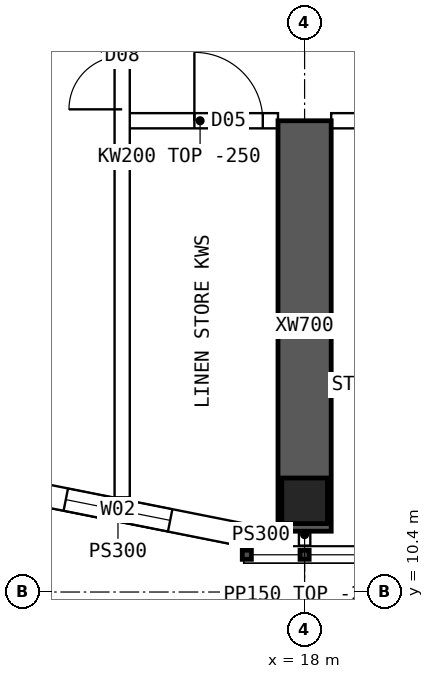
"""IFC4 building model, lengths in metres.
Left out: names, types, materials, properties, quantities, classifications, styles, units other than length and angle.
Written with IfcOpenShell. Run it as: python <this file> out.ifc"""

import sys

from ifc_helpers import new_model, si_unit, direction, frame, frame_2d, origin, origin_2d, place, context, subcontext, project, spatial, polyline, rectangle, hollow_rectangle, outline, extrude, element, fill, save


model = new_model("IFC4")
c1 = context("Model", 3, precision=1e-05, world=origin(), true_north=direction((0.0, 1.0)))
c2 = subcontext(c1, "Body", "Model", "MODEL_VIEW")
j1 = project(units=[si_unit("LENGTHUNIT", "METRE"), si_unit("PLANEANGLEUNIT", "RADIAN")], contexts=[c1])
p1 = place(None, origin())
s1 = spatial("IfcSite", under=j1, at=p1, CompositionType="ELEMENT")
p2 = place(p1, origin())
s2 = spatial("IfcBuilding", under=s1, at=p2, CompositionType="ELEMENT")
p3 = place(p2, frame((0.0, 0.0, 224.05)))
s3 = spatial("IfcBuildingStorey", under=s2, at=p3, CompositionType="ELEMENT", Elevation=224.05)
p4 = place(p3, frame((18.0, 11.6, 0.0), z_axis=(0.0, 0.0, 1.0), x_axis=(1.0, 0.0, 0.0)))
e1 = element("IfcColumn", 1, at=p4, inside=s3, PredefinedType="COLUMN", context=c2, shape_type="SweptSolid", body=[
    extrude(hollow_rectangle(XDim=0.6, YDim=0.6, WallThickness=0.06, at=origin_2d()), origin(), (0.0, 0.0, 1.0), 3.75),
])
p5 = place(p3, frame((18.0, 11.2, 0.0), z_axis=(0.0, 0.0, 1.0), x_axis=(0.0, 1.0, 0.0)))
e2 = element("IfcWall", 2, at=p5, inside=s3, PredefinedType="SHEAR", context=c2, shape_type="SweptSolid", body=[
    extrude(rectangle(XDim=5.4, YDim=0.7, at=frame_2d((2.7, 0.0))), origin(), (0.0, 0.0, 1.0), 3.75),
])
p6 = place(p3, frame((13.89, 11.808, 0.0), z_axis=(0.0, 0.0, 1.0), x_axis=(0.98078325777, -0.195100490205, 0.0)))
e3 = element("IfcWall", 3, at=p6, inside=s3, PredefinedType="SOLIDWALL", context=c2, shape_type="SweptSolid", body=[
    extrude(outline(polyline([(-0.03, -0.15), (3.405, -0.15), (3.345, 0.15), (0.03, 0.15), (-0.03, -0.15)])), origin(), (0.0, 0.0, 1.0), 3.5),
])
p7 = place(p6, frame((0.988, 0.0, 0.9)))
e4 = element("IfcOpeningElement", 4, at=p7, cuts=e3, PredefinedType="OPENING", context=c2, shape_type="SweptSolid", body=[
    extrude(rectangle(XDim=1.4, YDim=1.8, at=frame_2d((0.7, 0.9))), frame((0.0, 0.16, 0.0), z_axis=(0.0, -1.0, 0.0), x_axis=(1.0, 0.0, 0.0)), (0.0, 0.0, 1.0), 0.32),
])
p8 = place(p3, frame((17.2, 11.15, 0.0), z_axis=(0.0, 0.0, 1.0), x_axis=(1.0, 0.0, 0.0)))
e5 = element("IfcWall", 5, at=p8, inside=s3, PredefinedType="SOLIDWALL", context=c2, shape_type="SweptSolid", body=[
    extrude(rectangle(XDim=0.45, YDim=0.3, at=frame_2d((0.225, 0.0))), origin(), (0.0, 0.0, 1.0), 3.5),
])
p9 = place(p3, frame((15.6, 16.6, 0.0), z_axis=(0.0, 0.0, 1.0), x_axis=(1.0, 0.0, 0.0)))
e6 = element("IfcWall", 6, at=p9, inside=s3, PredefinedType="SOLIDWALL", context=c2, shape_type="SweptSolid", body=[
    extrude(rectangle(XDim=2.05, YDim=0.2, at=frame_2d((1.025, 0.0))), origin(), (0.0, 0.0, 1.0), 3.5),
])
p10 = place(p9, frame((0.95, 0.0, 0.0)))
e7 = element("IfcOpeningElement", 7, at=p10, cuts=e6, PredefinedType="OPENING", context=c2, shape_type="SweptSolid", body=[
    extrude(rectangle(XDim=0.9, YDim=2.1, at=frame_2d((0.45, 1.05))), frame((0.0, 0.11, 0.0), z_axis=(0.0, -1.0, 0.0), x_axis=(1.0, 0.0, 0.0)), (0.0, 0.0, 1.0), 0.22),
])
p11 = place(p3, frame((18.35, 16.6, 0.0), z_axis=(0.0, 0.0, 1.0), x_axis=(1.0, 0.0, 0.0)))
e8 = element("IfcWall", 8, at=p11, inside=s3, PredefinedType="SOLIDWALL", context=c2, shape_type="SweptSolid", body=[
    extrude(outline(polyline([(0.0, 0.0), (5.3, 0.0), (5.3, 3.1), (0.0, 3.1), (0.0, 0.0)])), frame((0.0, 0.1, 0.0), z_axis=(0.0, -1.0, 0.0), x_axis=(1.0, 0.0, 0.0)), (0.0, 0.0, 1.0), 0.2),
])
p12 = place(p11, frame((2.3, 0.0, 0.0)))
e9 = element("IfcOpeningElement", 9, at=p12, cuts=e8, PredefinedType="OPENING", context=c2, shape_type="SweptSolid", body=[
    extrude(rectangle(XDim=0.9, YDim=2.1, at=frame_2d((0.45, 1.05))), frame((0.0, 0.11, 0.0), z_axis=(0.0, -1.0, 0.0), x_axis=(1.0, 0.0, 0.0)), (0.0, 0.0, 1.0), 0.22),
])
p13 = place(p3, frame((15.6, 11.646, 0.0), z_axis=(0.0, 0.0, 1.0), x_axis=(0.0, 1.0, 0.0)))
e10 = element("IfcWall", 10, at=p13, inside=s3, PredefinedType="SOLIDWALL", context=c2, shape_type="SweptSolid", body=[
    extrude(rectangle(XDim=40.708, YDim=0.2, at=frame_2d((20.354, 0.0))), origin(), (0.0, 0.0, 1.0), 3.5),
])
p14 = place(p13, frame((13.434, 0.0, 0.0)))
e11 = element("IfcOpeningElement", 11, at=p14, cuts=e10, PredefinedType="OPENING", context=c2, shape_type="SweptSolid", body=[
    extrude(rectangle(XDim=1.2, YDim=2.1, at=frame_2d((0.6, 1.05))), frame((0.0, 0.11, 0.0), z_axis=(0.0, -1.0, 0.0), x_axis=(1.0, 0.0, 0.0)), (0.0, 0.0, 1.0), 0.22),
])
p15 = place(p13, frame((26.074, 0.0, 0.0)))
e12 = element("IfcOpeningElement", 12, at=p15, cuts=e10, PredefinedType="OPENING", context=c2, shape_type="SweptSolid", body=[
    extrude(rectangle(XDim=1.2, YDim=2.1, at=frame_2d((0.6, 1.05))), frame((0.0, 0.11, 0.0), z_axis=(0.0, -1.0, 0.0), x_axis=(1.0, 0.0, 0.0)), (0.0, 0.0, 1.0), 0.22),
])
p16 = place(p13, frame((5.104, 0.0, 0.0)))
e13 = element("IfcOpeningElement", 13, at=p16, cuts=e10, PredefinedType="OPENING", context=c2, shape_type="SweptSolid", body=[
    extrude(rectangle(XDim=1.4, YDim=2.1, at=frame_2d((0.7, 1.05))), frame((0.0, 0.11, 0.0), z_axis=(0.0, -1.0, 0.0), x_axis=(1.0, 0.0, 0.0)), (0.0, 0.0, 1.0), 0.22),
])
p17 = place(p13, frame((34.104, 0.0, 0.0)))
e14 = element("IfcOpeningElement", 14, at=p17, cuts=e10, PredefinedType="OPENING", context=c2, shape_type="SweptSolid", body=[
    extrude(rectangle(XDim=1.4, YDim=2.1, at=frame_2d((0.7, 1.05))), frame((0.0, 0.11, 0.0), z_axis=(0.0, -1.0, 0.0), x_axis=(1.0, 0.0, 0.0)), (0.0, 0.0, 1.0), 0.22),
])
p18 = place(p3, frame((18.0, 11.3, 0.0), z_axis=(0.0, 0.0, 1.0), x_axis=(0.0, -1.0, 0.0)))
e15 = element("IfcWall", 15, at=p18, inside=s3, PredefinedType="PARTITIONING", context=c2, shape_type="SweptSolid", body=[
    extrude(rectangle(XDim=0.29, YDim=0.15, at=frame_2d((0.145, 0.0))), origin(), (0.0, 0.0, 1.0), 3.5),
])
p19 = place(p7, origin())
e16 = element("IfcWindow", 16, at=p19, inside=s3, PartitioningType="SINGLE_PANEL", PredefinedType="WINDOW", context=c2, shape_type="SweptSolid", body=[
    extrude(rectangle(XDim=1.4, YDim=1.8, at=frame_2d((0.7, 0.9))), frame((0.0, 0.03, 0.0), z_axis=(0.0, -1.0, 0.0), x_axis=(1.0, 0.0, 0.0)), (0.0, 0.0, 1.0), 0.06),
])
fill(e4, e16)
p20 = place(p16, origin())
e17 = element("IfcDoor", 17, at=p20, inside=s3, OperationType="DOUBLE_DOOR_SINGLE_SWING", PredefinedType="DOOR", context=c2, shape_type="SweptSolid", body=[
    extrude(rectangle(XDim=1.4, YDim=2.1, at=frame_2d((0.7, 1.05))), frame((0.0, 0.025, 0.0), z_axis=(0.0, -1.0, 0.0), x_axis=(1.0, 0.0, 0.0)), (0.0, 0.0, 1.0), 0.05),
])
fill(e13, e17)
p21 = place(p10, origin())
e18 = element("IfcDoor", 18, at=p21, inside=s3, OperationType="SINGLE_SWING_LEFT", PredefinedType="DOOR", context=c2, shape_type="SweptSolid", body=[
    extrude(rectangle(XDim=0.9, YDim=2.1, at=frame_2d((0.45, 1.05))), frame((0.0, 0.025, 0.0), z_axis=(0.0, -1.0, 0.0), x_axis=(1.0, 0.0, 0.0)), (0.0, 0.0, 1.0), 0.05),
])
fill(e7, e18)
save(model, sys.argv[1])
